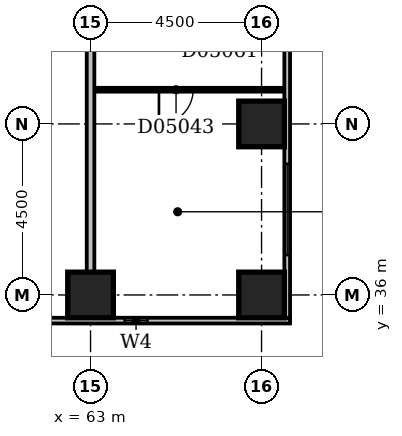
"""IFC4 building model, lengths in metres.
Left out: names, types, materials, properties, quantities, classifications, styles, units other than length and angle.
Written with IfcOpenShell. Run it as: python <this file> out.ifc"""

import sys

from ifc_helpers import new_model, si_unit, direction, frame, frame_2d, origin, origin_2d, place, context, subcontext, project, spatial, rectangle, extrude, element, fill, save


model = new_model("IFC4")
c1 = context("Model", 3, precision=1e-05, world=origin(), true_north=direction((0.0, 1.0)))
c2 = subcontext(c1, "Body", "Model", "MODEL_VIEW")
j1 = project(units=[si_unit("LENGTHUNIT", "METRE"), si_unit("PLANEANGLEUNIT", "RADIAN")], contexts=[c1])
p1 = place(None, origin())
s1 = spatial("IfcSite", under=j1, at=p1, CompositionType="ELEMENT")
p2 = place(p1, origin())
s2 = spatial("IfcBuilding", under=s1, at=p2, CompositionType="ELEMENT")
p3 = place(p2, frame((0.0, 0.0, 29.0)))
s3 = spatial("IfcBuildingStorey", under=s2, at=p3, CompositionType="ELEMENT", Elevation=29.0)
for number, where, z_axis, x_axis in (
    (1, (63.0, 36.0, -0.3), (0.0, 0.0, 1.0), (1.0, 0.0, 0.0)),
    (2, (67.5, 36.0, -0.3), (0.0, 0.0, 1.0), (1.0, 0.0, 0.0)),
    (3, (67.5, 40.5, -0.3), (0.0, 0.0, 1.0), (1.0, 0.0, 0.0)),
):
    element("IfcColumn", number, at=place(p3, frame(where, z_axis=z_axis, x_axis=x_axis)), inside=s3, PredefinedType="COLUMN", context=c2, shape_type="SweptSolid", body=[
        extrude(rectangle(XDim=1.2, YDim=1.2, at=origin_2d()), origin(), (0.0, 0.0, 1.0), 3.6),
    ])
p4 = place(p3, frame((23.1, 35.325, 0.0), z_axis=(0.0, 0.0, 1.0), x_axis=(1.0, 0.0, 0.0)))
e4 = element("IfcWall", 4, at=p4, inside=s3, PredefinedType="STANDARD", context=c2, shape_type="SweptSolid", body=[
    extrude(rectangle(XDim=45.15, YDim=0.15, at=frame_2d((22.575, 0.0))), origin(), (0.0, 0.0, 1.0), 2.7),
])
p5 = place(p4, frame((0.45, 0.0, 0.6)))
e5 = element("IfcOpeningElement", 5, at=p5, cuts=e4, PredefinedType="OPENING", context=c2, shape_type="SweptSolid", body=[
    extrude(rectangle(XDim=2.4, YDim=1.8, at=frame_2d((1.2, 0.9))), frame((0.0, 0.087, 0.0), z_axis=(0.0, -1.0, 0.0), x_axis=(1.0, 0.0, 0.0)), (0.0, 0.0, 1.0), 0.174),
])
p6 = place(p4, frame((4.95, 0.0, 0.6)))
e6 = element("IfcOpeningElement", 6, at=p6, cuts=e4, PredefinedType="OPENING", context=c2, shape_type="SweptSolid", body=[
    extrude(rectangle(XDim=2.4, YDim=1.8, at=frame_2d((1.2, 0.9))), frame((0.0, 0.087, 0.0), z_axis=(0.0, -1.0, 0.0), x_axis=(1.0, 0.0, 0.0)), (0.0, 0.0, 1.0), 0.174),
])
p7 = place(p4, frame((9.25, 0.0, 0.6)))
e7 = element("IfcOpeningElement", 7, at=p7, cuts=e4, PredefinedType="OPENING", context=c2, shape_type="SweptSolid", body=[
    extrude(rectangle(XDim=1.5, YDim=1.8, at=frame_2d((0.75, 0.9))), frame((0.0, 0.087, 0.0), z_axis=(0.0, -1.0, 0.0), x_axis=(1.0, 0.0, 0.0)), (0.0, 0.0, 1.0), 0.174),
])
p8 = place(p4, frame((15.277, 0.0, 0.6)))
e8 = element("IfcOpeningElement", 8, at=p8, cuts=e4, PredefinedType="OPENING", context=c2, shape_type="SweptSolid", body=[
    extrude(rectangle(XDim=1.2, YDim=1.8, at=frame_2d((0.6, 0.9))), frame((0.0, 0.087, 0.0), z_axis=(0.0, -1.0, 0.0), x_axis=(1.0, 0.0, 0.0)), (0.0, 0.0, 1.0), 0.174),
])
p9 = place(p4, frame((18.45, 0.0, 0.6)))
e9 = element("IfcOpeningElement", 9, at=p9, cuts=e4, PredefinedType="OPENING", context=c2, shape_type="SweptSolid", body=[
    extrude(rectangle(XDim=2.4, YDim=1.8, at=frame_2d((1.2, 0.9))), frame((0.0, 0.087, 0.0), z_axis=(0.0, -1.0, 0.0), x_axis=(1.0, 0.0, 0.0)), (0.0, 0.0, 1.0), 0.174),
])
p10 = place(p4, frame((22.95, 0.0, 0.6)))
e10 = element("IfcOpeningElement", 10, at=p10, cuts=e4, PredefinedType="OPENING", context=c2, shape_type="SweptSolid", body=[
    extrude(rectangle(XDim=2.4, YDim=1.8, at=frame_2d((1.2, 0.9))), frame((0.0, 0.087, 0.0), z_axis=(0.0, -1.0, 0.0), x_axis=(1.0, 0.0, 0.0)), (0.0, 0.0, 1.0), 0.174),
])
p11 = place(p4, frame((27.45, 0.0, 0.6)))
e11 = element("IfcOpeningElement", 11, at=p11, cuts=e4, PredefinedType="OPENING", context=c2, shape_type="SweptSolid", body=[
    extrude(rectangle(XDim=2.4, YDim=1.8, at=frame_2d((1.2, 0.9))), frame((0.0, 0.087, 0.0), z_axis=(0.0, -1.0, 0.0), x_axis=(1.0, 0.0, 0.0)), (0.0, 0.0, 1.0), 0.174),
])
p12 = place(p4, frame((31.95, 0.0, 0.6)))
e12 = element("IfcOpeningElement", 12, at=p12, cuts=e4, PredefinedType="OPENING", context=c2, shape_type="SweptSolid", body=[
    extrude(rectangle(XDim=2.4, YDim=1.8, at=frame_2d((1.2, 0.9))), frame((0.0, 0.087, 0.0), z_axis=(0.0, -1.0, 0.0), x_axis=(1.0, 0.0, 0.0)), (0.0, 0.0, 1.0), 0.174),
])
p13 = place(p4, frame((36.45, 0.0, 0.6)))
e13 = element("IfcOpeningElement", 13, at=p13, cuts=e4, PredefinedType="OPENING", context=c2, shape_type="SweptSolid", body=[
    extrude(rectangle(XDim=2.4, YDim=1.8, at=frame_2d((1.2, 0.9))), frame((0.0, 0.087, 0.0), z_axis=(0.0, -1.0, 0.0), x_axis=(1.0, 0.0, 0.0)), (0.0, 0.0, 1.0), 0.174),
])
p14 = place(p4, frame((40.797, 0.0, 0.6)))
e14 = element("IfcOpeningElement", 14, at=p14, cuts=e4, PredefinedType="OPENING", context=c2, shape_type="SweptSolid", body=[
    extrude(rectangle(XDim=0.6, YDim=1.8, at=frame_2d((0.3, 0.9))), frame((0.0, 0.087, 0.0), z_axis=(0.0, -1.0, 0.0), x_axis=(1.0, 0.0, 0.0)), (0.0, 0.0, 1.0), 0.174),
])
p15 = place(p3, frame((68.175, 35.4, 0.0), z_axis=(0.0, 0.0, 1.0), x_axis=(0.0, 1.0, 0.0)))
e15 = element("IfcWall", 15, at=p15, inside=s3, PredefinedType="STANDARD", context=c2, shape_type="SweptSolid", body=[
    extrude(rectangle(XDim=23.85, YDim=0.15, at=frame_2d((11.925, 0.0))), origin(), (0.0, 0.0, 1.0), 2.7),
])
p16 = place(p15, frame((1.65, 0.0, 0.6)))
e16 = element("IfcOpeningElement", 16, at=p16, cuts=e15, PredefinedType="OPENING", context=c2, shape_type="SweptSolid", body=[
    extrude(rectangle(XDim=2.4, YDim=1.8, at=frame_2d((1.2, 0.9))), frame((0.0, 0.087, 0.0), z_axis=(0.0, -1.0, 0.0), x_axis=(1.0, 0.0, 0.0)), (0.0, 0.0, 1.0), 0.174),
])
p17 = place(p15, frame((19.65, 0.0, 0.6)))
e17 = element("IfcOpeningElement", 17, at=p17, cuts=e15, PredefinedType="OPENING", context=c2, shape_type="SweptSolid", body=[
    extrude(rectangle(XDim=2.4, YDim=1.8, at=frame_2d((1.2, 0.9))), frame((0.0, 0.087, 0.0), z_axis=(0.0, -1.0, 0.0), x_axis=(1.0, 0.0, 0.0)), (0.0, 0.0, 1.0), 0.174),
])
p18 = place(p3, frame((63.0, 36.6, 0.0), z_axis=(0.0, 0.0, 1.0), x_axis=(0.0, 1.0, 0.0)))
e18 = element("IfcWall", 18, at=p18, inside=s3, PredefinedType="PARTITIONING", context=c2, shape_type="SweptSolid", body=[
    extrude(rectangle(XDim=12.8, YDim=0.2, at=frame_2d((6.4, 0.0))), origin(), (0.0, 0.0, 1.0), 2.4),
])
p19 = place(p3, frame((63.1, 41.4, 0.0), z_axis=(0.0, 0.0, 1.0), x_axis=(1.0, 0.0, 0.0)))
e19 = element("IfcWall", 19, at=p19, inside=s3, PredefinedType="PARTITIONING", context=c2, shape_type="SweptSolid", body=[
    extrude(rectangle(XDim=5.0, YDim=0.1, at=frame_2d((2.5, 0.0))), origin(), (0.0, 0.0, 1.0), 3.3),
])
p20 = place(p19, frame((1.7, 0.0, 0.0)))
e20 = element("IfcOpeningElement", 20, at=p20, cuts=e19, PredefinedType="OPENING", context=c2, shape_type="SweptSolid", body=[
    extrude(rectangle(XDim=0.9, YDim=2.1, at=frame_2d((0.45, 1.05))), frame((0.0, 0.062, 0.0), z_axis=(0.0, -1.0, 0.0), x_axis=(1.0, 0.0, 0.0)), (0.0, 0.0, 1.0), 0.124),
])
p21 = place(p14, origin())
e21 = element("IfcWindow", 21, at=p21, inside=s3, PartitioningType="SINGLE_PANEL", PredefinedType="WINDOW", context=c2, shape_type="SweptSolid", body=[
    extrude(rectangle(XDim=0.6, YDim=1.8, at=frame_2d((0.3, 0.9))), frame((0.0, 0.03, 0.0), z_axis=(0.0, -1.0, 0.0), x_axis=(1.0, 0.0, 0.0)), (0.0, 0.0, 1.0), 0.06),
])
fill(e14, e21)
p22 = place(p16, origin())
e22 = element("IfcWindow", 22, at=p22, inside=s3, PartitioningType="SINGLE_PANEL", PredefinedType="WINDOW", context=c2, shape_type="SweptSolid", body=[
    extrude(rectangle(XDim=2.4, YDim=1.8, at=frame_2d((1.2, 0.9))), frame((0.0, 0.03, 0.0), z_axis=(0.0, -1.0, 0.0), x_axis=(1.0, 0.0, 0.0)), (0.0, 0.0, 1.0), 0.06),
])
fill(e16, e22)
p23 = place(p20, frame((0.9, 0.0, 0.0), z_axis=(0.0, 0.0, 1.0), x_axis=(-1.0, 0.0, 0.0)))
e23 = element("IfcDoor", 23, at=p23, inside=s3, OperationType="SINGLE_SWING_RIGHT", PredefinedType="DOOR", context=c2, shape_type="SweptSolid", body=[
    extrude(rectangle(XDim=0.9, YDim=2.1, at=frame_2d((0.45, 1.05))), frame((0.0, 0.025, 0.0), z_axis=(0.0, -1.0, 0.0), x_axis=(1.0, 0.0, 0.0)), (0.0, 0.0, 1.0), 0.05),
])
fill(e20, e23)
save(model, sys.argv[1])
